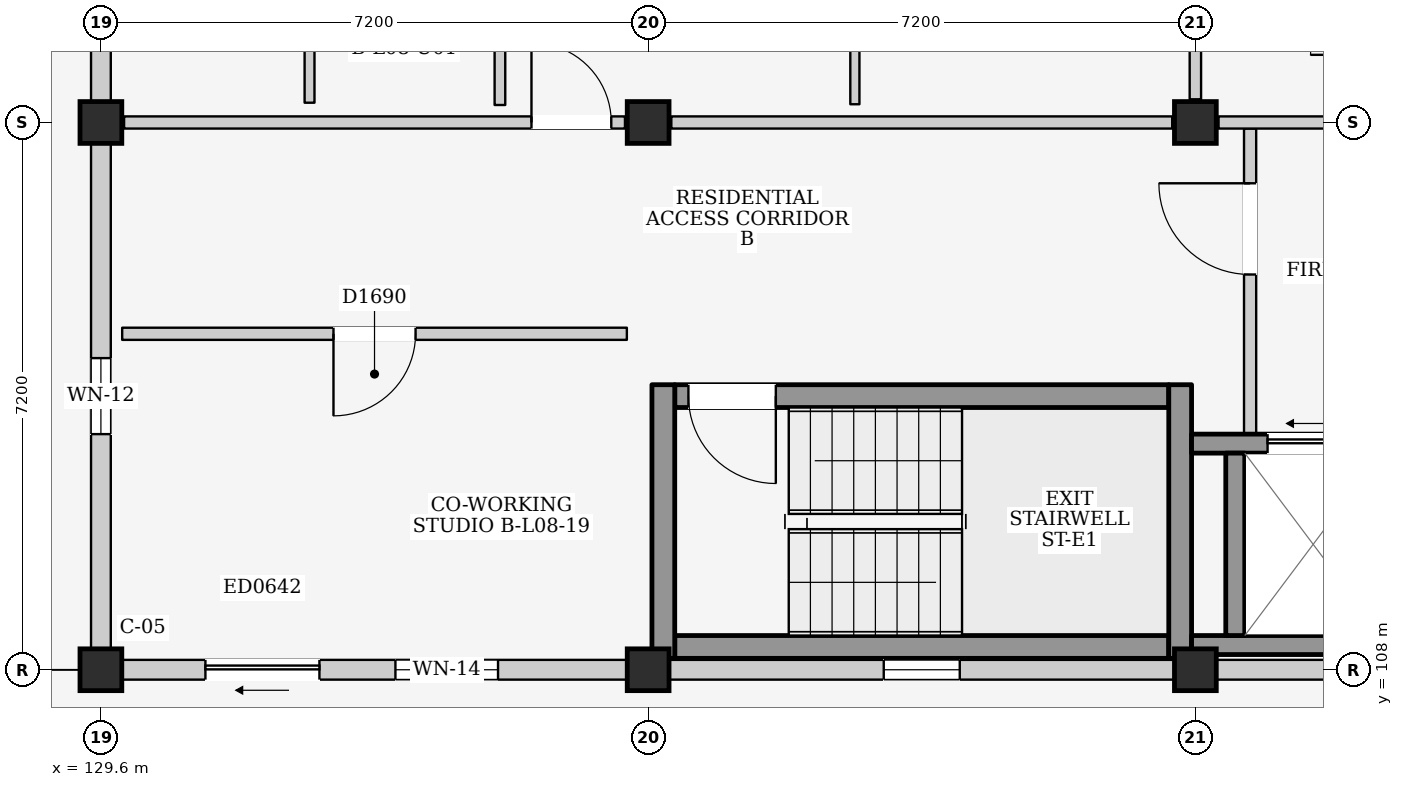
"""IFC4 building model, lengths in metres.
Left out: names, types, materials, properties, quantities, classifications, styles, units other than length and angle.
Written with IfcOpenShell. Run it as: python <this file> out.ifc"""

import sys

from ifc_helpers import new_model, si_unit, direction, frame, frame_2d, origin, origin_2d, place, context, subcontext, project, spatial, rectangle, extrude, element, fill, save


model = new_model("IFC4")
c1 = context("Model", 3, precision=1e-05, world=origin(), true_north=direction((0.0, 1.0)))
c2 = subcontext(c1, "Body", "Model", "MODEL_VIEW")
j1 = project(units=[si_unit("LENGTHUNIT", "METRE"), si_unit("PLANEANGLEUNIT", "RADIAN")], contexts=[c1])
p1 = place(None, origin())
s1 = spatial("IfcSite", under=j1, at=p1, CompositionType="ELEMENT")
p2 = place(p1, origin())
s2 = spatial("IfcBuilding", under=s1, at=p2, CompositionType="ELEMENT")
p3 = place(p2, frame((0.0, 0.0, 28.3)))
s3 = spatial("IfcBuildingStorey", under=s2, at=p3, CompositionType="ELEMENT", Elevation=28.3)
for number, where, z_axis, x_axis in (
    (1, (129.6, 108.0, 0.0), (0.0, 0.0, 1.0), (1.0, 0.0, 0.0)),
    (2, (129.6, 115.2, 0.0), (0.0, 0.0, 1.0), (1.0, 0.0, 0.0)),
    (3, (136.8, 108.0, 0.0), (0.0, 0.0, 1.0), (1.0, 0.0, 0.0)),
    (4, (136.8, 115.2, 0.0), (0.0, 0.0, 1.0), (1.0, 0.0, 0.0)),
    (5, (144.0, 108.0, 0.0), (0.0, 0.0, 1.0), (1.0, 0.0, 0.0)),
    (6, (144.0, 115.2, 0.0), (0.0, 0.0, 1.0), (1.0, 0.0, 0.0)),
):
    element("IfcColumn", number, at=place(p3, frame(where, z_axis=z_axis, x_axis=x_axis)), inside=s3, PredefinedType="COLUMN", context=c2, shape_type="SweptSolid", body=[
        extrude(rectangle(XDim=0.55, YDim=0.55, at=origin_2d()), origin(), (0.0, 0.0, 1.0), 3.2),
    ])
p4 = place(p3, frame((129.875, 108.0, 0.0), z_axis=(0.0, 0.0, 1.0), x_axis=(1.0, 0.0, 0.0)))
e7 = element("IfcWall", 7, at=p4, inside=s3, PredefinedType="ELEMENTEDWALL", context=c2, shape_type="SweptSolid", body=[
    extrude(rectangle(XDim=6.65, YDim=0.26, at=frame_2d((3.325, 0.0))), origin(), (0.0, 0.0, 1.0), 2.335),
])
p5 = place(p4, frame((1.1, 0.0, 0.0)))
e8 = element("IfcOpeningElement", 8, at=p5, cuts=e7, PredefinedType="OPENING", context=c2, shape_type="SweptSolid", body=[
    extrude(rectangle(XDim=1.5, YDim=2.12, at=frame_2d((0.75, 1.06))), frame((0.0, 0.145, 0.0), z_axis=(0.0, -1.0, 0.0), x_axis=(1.0, 0.0, 0.0)), (0.0, 0.0, 1.0), 0.29),
])
p6 = place(p4, frame((3.6, 0.0, 0.725)))
e9 = element("IfcOpeningElement", 9, at=p6, cuts=e7, PredefinedType="OPENING", context=c2, shape_type="SweptSolid", body=[
    extrude(rectangle(XDim=1.35, YDim=1.5, at=frame_2d((0.675, 0.75))), frame((0.0, 0.145, 0.0), z_axis=(0.0, -1.0, 0.0), x_axis=(1.0, 0.0, 0.0)), (0.0, 0.0, 1.0), 0.29),
])
p7 = place(p3, frame((129.6, 108.275, 0.0), z_axis=(0.0, 0.0, 1.0), x_axis=(0.0, 1.0, 0.0)))
e10 = element("IfcWall", 10, at=p7, inside=s3, PredefinedType="ELEMENTEDWALL", context=c2, shape_type="SweptSolid", body=[
    extrude(rectangle(XDim=6.65, YDim=0.26, at=frame_2d((3.325, 0.0))), origin(), (0.0, 0.0, 1.0), 2.435),
])
p8 = place(p7, frame((2.825, 0.0, 1.1)))
e11 = element("IfcOpeningElement", 11, at=p8, cuts=e10, PredefinedType="OPENING", context=c2, shape_type="SweptSolid", body=[
    extrude(rectangle(XDim=1.0, YDim=0.9, at=frame_2d((0.5, 0.45))), frame((0.0, 0.145, 0.0), z_axis=(0.0, -1.0, 0.0), x_axis=(1.0, 0.0, 0.0)), (0.0, 0.0, 1.0), 0.29),
])
p9 = place(p3, frame((129.6, 115.475, 0.0), z_axis=(0.0, 0.0, 1.0), x_axis=(0.0, 1.0, 0.0)))
e12 = element("IfcWall", 12, at=p9, inside=s3, PredefinedType="ELEMENTEDWALL", context=c2, shape_type="SweptSolid", body=[
    extrude(rectangle(XDim=6.65, YDim=0.26, at=frame_2d((3.325, 0.0))), origin(), (0.0, 0.0, 1.0), 2.435),
])
p10 = place(p9, frame((3.65, 0.0, 0.0)))
e13 = element("IfcOpeningElement", 13, at=p10, cuts=e12, PredefinedType="OPENING", context=c2, shape_type="SweptSolid", body=[
    extrude(rectangle(XDim=1.4, YDim=2.1, at=frame_2d((0.7, 1.05))), frame((0.0, 0.145, 0.0), z_axis=(0.0, -1.0, 0.0), x_axis=(1.0, 0.0, 0.0)), (0.0, 0.0, 1.0), 0.29),
])
p11 = place(p9, frame((0.85, 0.0, 0.95)))
e14 = element("IfcOpeningElement", 14, at=p11, cuts=e12, PredefinedType="OPENING", context=c2, shape_type="SweptSolid", body=[
    extrude(rectangle(XDim=1.2, YDim=1.35, at=frame_2d((0.6, 0.675))), frame((0.0, 0.145, 0.0), z_axis=(0.0, -1.0, 0.0), x_axis=(1.0, 0.0, 0.0)), (0.0, 0.0, 1.0), 0.29),
])
p12 = place(p3, frame((137.075, 108.0, 0.0), z_axis=(0.0, 0.0, 1.0), x_axis=(1.0, 0.0, 0.0)))
e15 = element("IfcWall", 15, at=p12, inside=s3, PredefinedType="ELEMENTEDWALL", context=c2, shape_type="SweptSolid", body=[
    extrude(rectangle(XDim=6.65, YDim=0.26, at=frame_2d((3.325, 0.0))), origin(), (0.0, 0.0, 1.0), 2.335),
])
p13 = place(p12, frame((2.825, 0.0, 1.2)))
e16 = element("IfcOpeningElement", 16, at=p13, cuts=e15, PredefinedType="OPENING", context=c2, shape_type="SweptSolid", body=[
    extrude(rectangle(XDim=1.0, YDim=0.9, at=frame_2d((0.5, 0.45))), frame((0.0, 0.145, 0.0), z_axis=(0.0, -1.0, 0.0), x_axis=(1.0, 0.0, 0.0)), (0.0, 0.0, 1.0), 0.29),
])
p14 = place(p3, frame((144.275, 108.0, 0.0), z_axis=(0.0, 0.0, 1.0), x_axis=(1.0, 0.0, 0.0)))
e17 = element("IfcWall", 17, at=p14, inside=s3, PredefinedType="ELEMENTEDWALL", context=c2, shape_type="SweptSolid", body=[
    extrude(rectangle(XDim=6.65, YDim=0.26, at=frame_2d((3.325, 0.0))), origin(), (0.0, 0.0, 1.0), 2.335),
])
p15 = place(p14, frame((2.825, 0.0, 1.2)))
e18 = element("IfcOpeningElement", 18, at=p15, cuts=e17, PredefinedType="OPENING", context=c2, shape_type="SweptSolid", body=[
    extrude(rectangle(XDim=1.0, YDim=0.9, at=frame_2d((0.5, 0.45))), frame((0.0, 0.145, 0.0), z_axis=(0.0, -1.0, 0.0), x_axis=(1.0, 0.0, 0.0)), (0.0, 0.0, 1.0), 0.29),
])
p16 = place(p3, frame((137.15, 108.3, 0.0), z_axis=(0.0, 0.0, 1.0), x_axis=(1.0, 0.0, 0.0)))
e19 = element("IfcWall", 19, at=p16, inside=s3, PredefinedType="SHEAR", context=c2, shape_type="SweptSolid", body=[
    extrude(rectangle(XDim=6.5, YDim=0.3, at=frame_2d((3.25, 0.0))), origin(), (0.0, 0.0, 1.0), 2.95),
])
p17 = place(p3, frame((137.15, 111.6, 0.0), z_axis=(0.0, 0.0, 1.0), x_axis=(1.0, 0.0, 0.0)))
e20 = element("IfcWall", 20, at=p17, inside=s3, PredefinedType="SHEAR", context=c2, shape_type="SweptSolid", body=[
    extrude(rectangle(XDim=6.5, YDim=0.3, at=frame_2d((3.25, 0.0))), origin(), (0.0, 0.0, 1.0), 2.95),
])
p18 = place(p17, frame((0.18, 0.0, 0.0)))
e21 = element("IfcOpeningElement", 21, at=p18, cuts=e20, PredefinedType="OPENING", context=c2, shape_type="SweptSolid", body=[
    extrude(rectangle(XDim=1.15, YDim=2.2, at=frame_2d((0.575, 1.1))), frame((0.0, 0.165, 0.0), z_axis=(0.0, -1.0, 0.0), x_axis=(1.0, 0.0, 0.0)), (0.0, 0.0, 1.0), 0.33),
])
for number, where, z_axis, x_axis in (
    (22, (137.0, 108.15, 0.0), (0.0, 0.0, 1.0), (0.0, 1.0, 0.0)),
    (23, (143.8, 108.15, 0.0), (0.0, 0.0, 1.0), (0.0, 1.0, 0.0)),
):
    element("IfcWall", number, at=place(p3, frame(where, z_axis=z_axis, x_axis=x_axis)), inside=s3, PredefinedType="SHEAR", context=c2, shape_type="SweptSolid", body=[
        extrude(rectangle(XDim=3.6, YDim=0.3, at=frame_2d((1.8, 0.0))), origin(), (0.0, 0.0, 1.0), 2.95),
    ])
p19 = place(p3, frame((144.72, 111.1, 0.0), z_axis=(0.0, 0.0, 1.0), x_axis=(0.0, 1.0, 0.0)))
e24 = element("IfcWall", 24, at=p19, inside=s3, PredefinedType="PARTITIONING", context=c2, shape_type="SweptSolid", body=[
    extrude(rectangle(XDim=4.02, YDim=0.16, at=frame_2d((2.01, 0.0))), origin(), (0.0, 0.0, 1.0), 2.95),
])
p20 = place(p19, frame((2.1, 0.0, 0.0)))
e25 = element("IfcOpeningElement", 25, at=p20, cuts=e24, PredefinedType="OPENING", context=c2, shape_type="SweptSolid", body=[
    extrude(rectangle(XDim=1.2, YDim=2.2, at=frame_2d((0.6, 1.1))), frame((0.0, 0.095, 0.0), z_axis=(0.0, -1.0, 0.0), x_axis=(1.0, 0.0, 0.0)), (0.0, 0.0, 1.0), 0.19),
])
p21 = place(p3, frame((143.95, 108.325, 0.0), z_axis=(0.0, 0.0, 1.0), x_axis=(1.0, 0.0, 0.0)))
e26 = element("IfcWall", 26, at=p21, inside=s3, PredefinedType="SHEAR", context=c2, shape_type="SweptSolid", body=[
    extrude(rectangle(XDim=2.675, YDim=0.25, at=frame_2d((1.337, 0.0))), origin(), (0.0, 0.0, 1.0), 2.95),
])
p22 = place(p3, frame((143.95, 110.975, 0.0), z_axis=(0.0, 0.0, 1.0), x_axis=(1.0, 0.0, 0.0)))
e27 = element("IfcWall", 27, at=p22, inside=s3, PredefinedType="SHEAR", context=c2, shape_type="SweptSolid", body=[
    extrude(rectangle(XDim=2.675, YDim=0.25, at=frame_2d((1.337, 0.0))), origin(), (0.0, 0.0, 1.0), 2.95),
])
p23 = place(p22, frame((1.0, 0.0, 0.0)))
e28 = element("IfcOpeningElement", 28, at=p23, cuts=e27, PredefinedType="OPENING", context=c2, shape_type="SweptSolid", body=[
    extrude(rectangle(XDim=1.2, YDim=2.25, at=frame_2d((0.6, 1.125))), frame((0.0, 0.14, 0.0), z_axis=(0.0, -1.0, 0.0), x_axis=(1.0, 0.0, 0.0)), (0.0, 0.0, 1.0), 0.28),
])
p24 = place(p3, frame((144.525, 108.45, 0.0), z_axis=(0.0, 0.0, 1.0), x_axis=(0.0, 1.0, 0.0)))
e29 = element("IfcWall", 29, at=p24, inside=s3, PredefinedType="SHEAR", context=c2, shape_type="SweptSolid", body=[
    extrude(rectangle(XDim=2.4, YDim=0.25, at=frame_2d((1.2, 0.0))), origin(), (0.0, 0.0, 1.0), 2.95),
])
p25 = place(p3, frame((129.905, 115.2, 0.0), z_axis=(0.0, 0.0, 1.0), x_axis=(1.0, 0.0, 0.0)))
e30 = element("IfcWall", 30, at=p25, inside=s3, PredefinedType="PARTITIONING", context=c2, shape_type="SweptSolid", body=[
    extrude(rectangle(XDim=6.59, YDim=0.16, at=frame_2d((3.295, 0.0))), origin(), (0.0, 0.0, 1.0), 2.335),
])
p26 = place(p25, frame((5.36, 0.0, 0.0)))
e31 = element("IfcOpeningElement", 31, at=p26, cuts=e30, PredefinedType="OPENING", context=c2, shape_type="SweptSolid", body=[
    extrude(rectangle(XDim=1.05, YDim=2.15, at=frame_2d((0.525, 1.075))), frame((0.0, 0.095, 0.0), z_axis=(0.0, -1.0, 0.0), x_axis=(1.0, 0.0, 0.0)), (0.0, 0.0, 1.0), 0.19),
])
p27 = place(p3, frame((137.105, 115.2, 0.0), z_axis=(0.0, 0.0, 1.0), x_axis=(1.0, 0.0, 0.0)))
e32 = element("IfcWall", 32, at=p27, inside=s3, PredefinedType="PARTITIONING", context=c2, shape_type="SweptSolid", body=[
    extrude(rectangle(XDim=6.59, YDim=0.16, at=frame_2d((3.295, 0.0))), origin(), (0.0, 0.0, 1.0), 2.335),
])
p28 = place(p3, frame((144.0, 115.505, 0.0), z_axis=(0.0, 0.0, 1.0), x_axis=(0.0, 1.0, 0.0)))
e33 = element("IfcWall", 33, at=p28, inside=s3, PredefinedType="PARTITIONING", context=c2, shape_type="SweptSolid", body=[
    extrude(rectangle(XDim=6.59, YDim=0.15, at=frame_2d((3.295, 0.0))), origin(), (0.0, 0.0, 1.0), 2.435),
])
p29 = place(p3, frame((132.345, 115.46, 0.0), z_axis=(0.0, 0.0, 1.0), x_axis=(0.0, 1.0, 0.0)))
e34 = element("IfcWall", 34, at=p29, inside=s3, PredefinedType="PARTITIONING", context=c2, shape_type="SweptSolid", body=[
    extrude(rectangle(XDim=3.04, YDim=0.13, at=frame_2d((1.52, 0.0))), origin(), (0.0, 0.0, 1.0), 2.95),
])
p30 = place(p3, frame((134.85, 115.43, 0.0), z_axis=(0.0, 0.0, 1.0), x_axis=(0.0, 1.0, 0.0)))
e35 = element("IfcWall", 35, at=p30, inside=s3, PredefinedType="PARTITIONING", context=c2, shape_type="SweptSolid", body=[
    extrude(rectangle(XDim=3.06, YDim=0.14, at=frame_2d((1.53, 0.0))), origin(), (0.0, 0.0, 1.0), 2.95),
])
p31 = place(p3, frame((139.52, 115.44, 0.0), z_axis=(0.0, 0.0, 1.0), x_axis=(0.0, 1.0, 0.0)))
e36 = element("IfcWall", 36, at=p31, inside=s3, PredefinedType="PARTITIONING", context=c2, shape_type="SweptSolid", body=[
    extrude(rectangle(XDim=3.04, YDim=0.12, at=frame_2d((1.52, 0.0))), origin(), (0.0, 0.0, 1.0), 2.95),
])
p32 = place(p31, frame((1.04, 0.0, 0.0)))
e37 = element("IfcOpeningElement", 37, at=p32, cuts=e36, PredefinedType="OPENING", context=c2, shape_type="SweptSolid", body=[
    extrude(rectangle(XDim=0.96, YDim=2.15, at=frame_2d((0.48, 1.075))), frame((0.0, 0.075, 0.0), z_axis=(0.0, -1.0, 0.0), x_axis=(1.0, 0.0, 0.0)), (0.0, 0.0, 1.0), 0.15),
])
p33 = place(p3, frame((144.305, 115.2, 0.0), z_axis=(0.0, 0.0, 1.0), x_axis=(1.0, 0.0, 0.0)))
e38 = element("IfcWall", 38, at=p33, inside=s3, PredefinedType="PARTITIONING", context=c2, shape_type="SweptSolid", body=[
    extrude(rectangle(XDim=6.59, YDim=0.16, at=frame_2d((3.295, 0.0))), origin(), (0.0, 0.0, 1.0), 2.335),
])
p34 = place(p33, frame((4.12, 0.0, 0.0)))
e39 = element("IfcOpeningElement", 39, at=p34, cuts=e38, PredefinedType="OPENING", context=c2, shape_type="SweptSolid", body=[
    extrude(rectangle(XDim=1.05, YDim=2.15, at=frame_2d((0.525, 1.075))), frame((0.0, 0.095, 0.0), z_axis=(0.0, -1.0, 0.0), x_axis=(1.0, 0.0, 0.0)), (0.0, 0.0, 1.0), 0.19),
])
p35 = place(p3, frame((129.88, 112.42, 0.0), z_axis=(0.0, 0.0, 1.0), x_axis=(1.0, 0.0, 0.0)))
e40 = element("IfcWall", 40, at=p35, inside=s3, PredefinedType="PARTITIONING", context=c2, shape_type="SweptSolid", body=[
    extrude(rectangle(XDim=6.64, YDim=0.16, at=frame_2d((3.32, 0.0))), origin(), (0.0, 0.0, 1.0), 2.95),
])
p36 = place(p35, frame((2.78, 0.0, 0.0)))
e41 = element("IfcOpeningElement", 41, at=p36, cuts=e40, PredefinedType="OPENING", context=c2, shape_type="SweptSolid", body=[
    extrude(rectangle(XDim=1.08, YDim=2.22, at=frame_2d((0.54, 1.11))), frame((0.0, 0.095, 0.0), z_axis=(0.0, -1.0, 0.0), x_axis=(1.0, 0.0, 0.0)), (0.0, 0.0, 1.0), 0.19),
])
p37 = place(p5, frame((1.5, 0.0, 0.0), z_axis=(0.0, 0.0, 1.0), x_axis=(-1.0, 0.0, 0.0)))
e42 = element("IfcDoor", 42, at=p37, inside=s3, OperationType="SLIDING_TO_LEFT", PredefinedType="DOOR", context=c2, shape_type="SweptSolid", body=[
    extrude(rectangle(XDim=1.5, YDim=2.12, at=frame_2d((0.75, 1.06))), frame((0.0, 0.025, 0.0), z_axis=(0.0, -1.0, 0.0), x_axis=(1.0, 0.0, 0.0)), (0.0, 0.0, 1.0), 0.05),
])
fill(e8, e42)
p38 = place(p6, origin())
e43 = element("IfcWindow", 43, at=p38, inside=s3, PartitioningType="SINGLE_PANEL", PredefinedType="WINDOW", context=c2, shape_type="SweptSolid", body=[
    extrude(rectangle(XDim=1.35, YDim=1.5, at=frame_2d((0.675, 0.75))), frame((0.0, 0.03, 0.0), z_axis=(0.0, -1.0, 0.0), x_axis=(1.0, 0.0, 0.0)), (0.0, 0.0, 1.0), 0.06),
])
fill(e9, e43)
p39 = place(p8, origin())
e44 = element("IfcWindow", 44, at=p39, inside=s3, PartitioningType="SINGLE_PANEL", PredefinedType="WINDOW", context=c2, shape_type="SweptSolid", body=[
    extrude(rectangle(XDim=1.0, YDim=0.9, at=frame_2d((0.5, 0.45))), frame((0.0, 0.03, 0.0), z_axis=(0.0, -1.0, 0.0), x_axis=(1.0, 0.0, 0.0)), (0.0, 0.0, 1.0), 0.06),
])
fill(e11, e44)
p40 = place(p13, origin())
e45 = element("IfcWindow", 45, at=p40, inside=s3, PartitioningType="SINGLE_PANEL", PredefinedType="WINDOW", context=c2, shape_type="SweptSolid", body=[
    extrude(rectangle(XDim=1.0, YDim=0.9, at=frame_2d((0.5, 0.45))), frame((0.0, 0.03, 0.0), z_axis=(0.0, -1.0, 0.0), x_axis=(1.0, 0.0, 0.0)), (0.0, 0.0, 1.0), 0.06),
])
fill(e16, e45)
p41 = place(p18, frame((1.15, 0.0, 0.0), z_axis=(0.0, 0.0, 1.0), x_axis=(-1.0, 0.0, 0.0)))
e46 = element("IfcDoor", 46, at=p41, inside=s3, OperationType="SINGLE_SWING_LEFT", PredefinedType="DOOR", context=c2, shape_type="SweptSolid", body=[
    extrude(rectangle(XDim=1.15, YDim=2.2, at=frame_2d((0.575, 1.1))), frame((0.0, 0.025, 0.0), z_axis=(0.0, -1.0, 0.0), x_axis=(1.0, 0.0, 0.0)), (0.0, 0.0, 1.0), 0.05),
])
fill(e21, e46)
p42 = place(p20, origin())
e47 = element("IfcDoor", 47, at=p42, inside=s3, OperationType="SINGLE_SWING_RIGHT", PredefinedType="DOOR", context=c2, shape_type="SweptSolid", body=[
    extrude(rectangle(XDim=1.2, YDim=2.2, at=frame_2d((0.6, 1.1))), frame((0.0, 0.025, 0.0), z_axis=(0.0, -1.0, 0.0), x_axis=(1.0, 0.0, 0.0)), (0.0, 0.0, 1.0), 0.05),
])
fill(e25, e47)
p43 = place(p23, origin())
e48 = element("IfcDoor", 48, at=p43, inside=s3, OperationType="SLIDING_TO_LEFT", PredefinedType="DOOR", context=c2, shape_type="SweptSolid", body=[
    extrude(rectangle(XDim=1.2, YDim=2.25, at=frame_2d((0.6, 1.125))), frame((0.0, 0.025, 0.0), z_axis=(0.0, -1.0, 0.0), x_axis=(1.0, 0.0, 0.0)), (0.0, 0.0, 1.0), 0.05),
])
fill(e28, e48)
p44 = place(p26, origin())
e49 = element("IfcDoor", 49, at=p44, inside=s3, OperationType="SINGLE_SWING_LEFT", PredefinedType="DOOR", context=c2, shape_type="SweptSolid", body=[
    extrude(rectangle(XDim=1.05, YDim=2.15, at=frame_2d((0.525, 1.075))), frame((0.0, 0.025, 0.0), z_axis=(0.0, -1.0, 0.0), x_axis=(1.0, 0.0, 0.0)), (0.0, 0.0, 1.0), 0.05),
])
fill(e31, e49)
p45 = place(p36, frame((1.08, 0.0, 0.0), z_axis=(0.0, 0.0, 1.0), x_axis=(-1.0, 0.0, 0.0)))
e50 = element("IfcDoor", 50, at=p45, inside=s3, OperationType="SINGLE_SWING_RIGHT", PredefinedType="DOOR", context=c2, shape_type="SweptSolid", body=[
    extrude(rectangle(XDim=1.08, YDim=2.22, at=frame_2d((0.54, 1.11))), frame((0.0, 0.025, 0.0), z_axis=(0.0, -1.0, 0.0), x_axis=(1.0, 0.0, 0.0)), (0.0, 0.0, 1.0), 0.05),
])
fill(e41, e50)
save(model, sys.argv[1])
